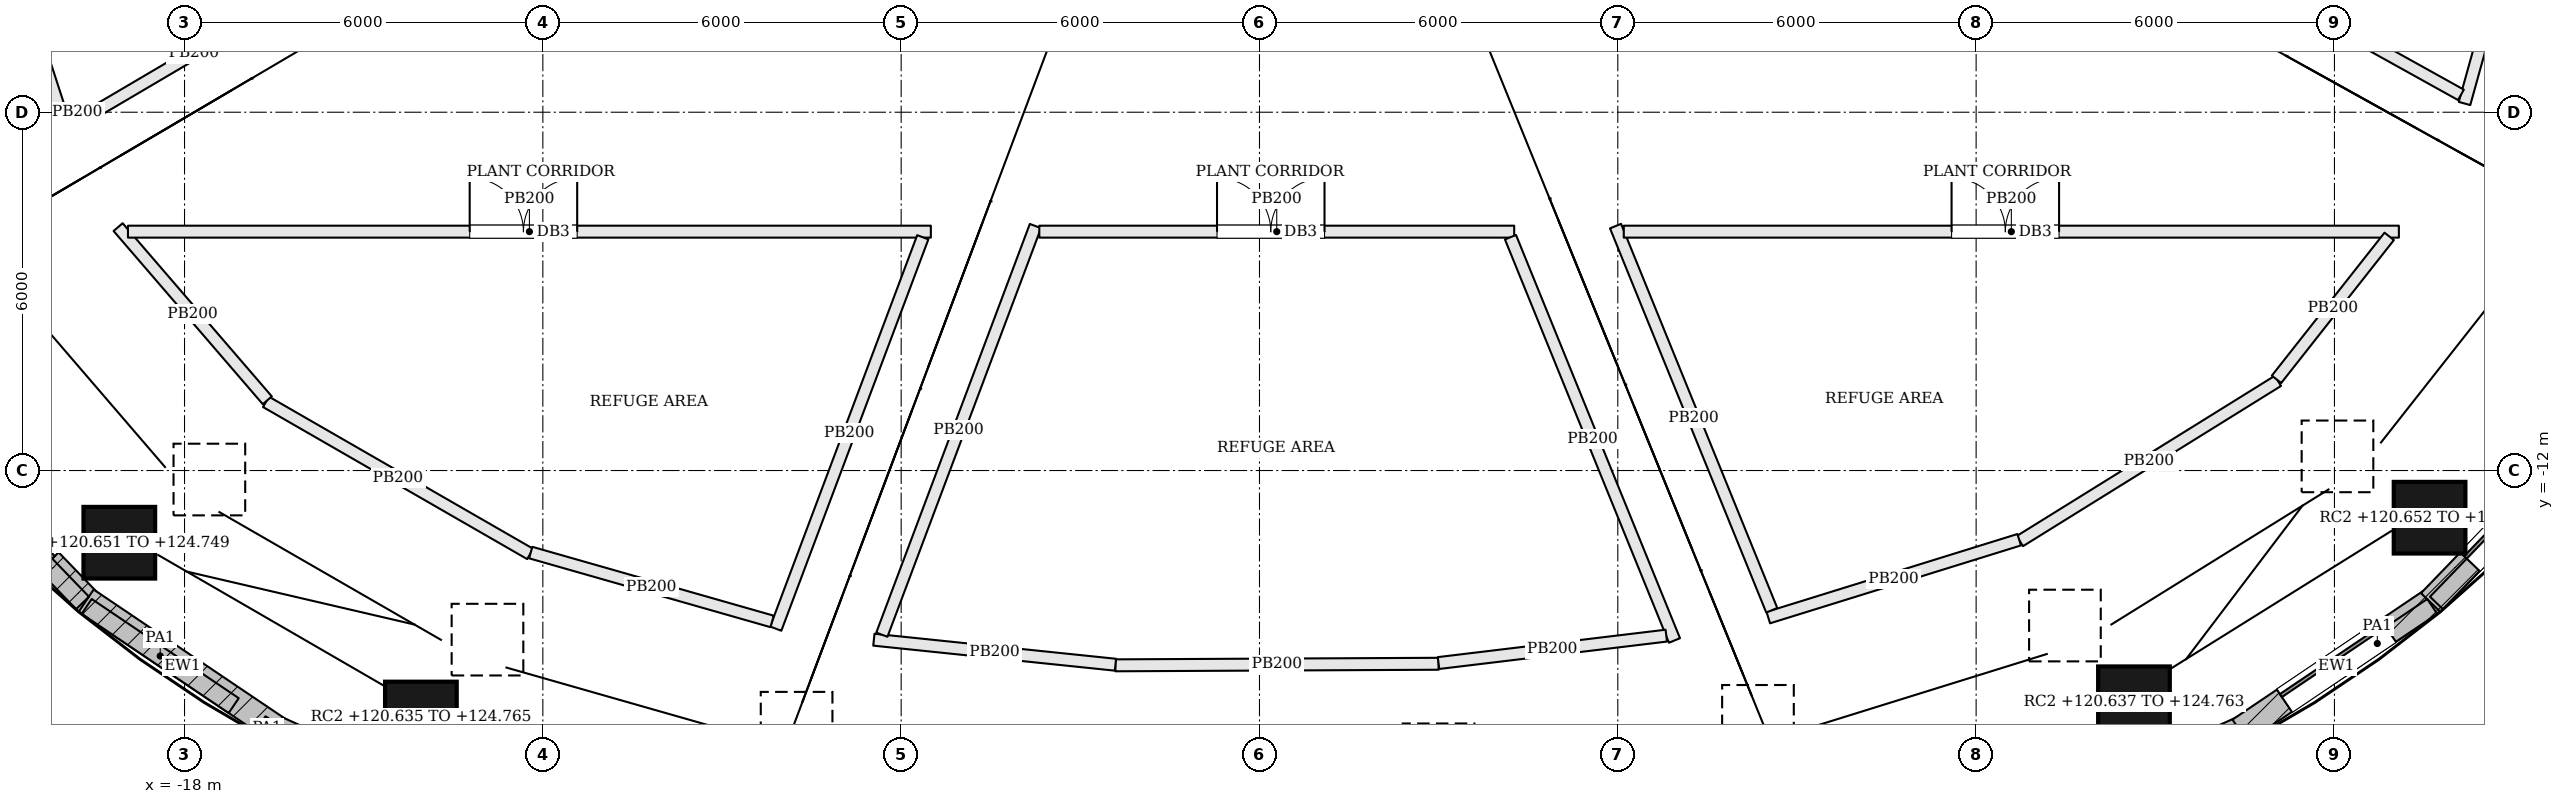
"""IFC4 building model, lengths in metres.
Left out: names, types, materials, properties, quantities, classifications, styles, units other than length and angle.
Written with IfcOpenShell. Run it as: python <this file> out.ifc"""

import sys

from ifc_helpers import new_model, si_unit, direction, frame, frame_2d, origin, origin_2d, place, context, subcontext, project, spatial, rectangle, extrude, element, fill, save


model = new_model("IFC4")
c1 = context("Model", 3, precision=1e-05, world=origin(), true_north=direction((0.0, 1.0)))
c2 = subcontext(c1, "Body", "Model", "MODEL_VIEW")
j1 = project(units=[si_unit("LENGTHUNIT", "METRE"), si_unit("PLANEANGLEUNIT", "RADIAN")], contexts=[c1])
p1 = place(None, origin())
s1 = spatial("IfcSite", under=j1, at=p1, CompositionType="ELEMENT")
p2 = place(p1, origin())
s2 = spatial("IfcBuilding", under=s1, at=p2, CompositionType="ELEMENT")
p3 = place(p2, frame((0.0, 0.0, 121.2)))
s3 = spatial("IfcBuildingStorey", under=s2, at=p3, CompositionType="ELEMENT", Elevation=121.2)
p4 = place(p3, frame((-19.092, -13.209, -0.549), z_axis=(0.335632832072, 0.235491775004, 0.912082356995), x_axis=(-0.574360318683, 0.818602604639, 0.0)))
e1 = element("IfcColumn", 1, at=p4, inside=s3, PredefinedType="COLUMN", context=c2, shape_type="SweptSolid", body=[
    extrude(rectangle(XDim=1.2, YDim=1.2, at=origin_2d()), origin(), (0.0, 0.0, 1.0), 4.493),
])
p5 = place(p3, frame((-14.042, -16.136, -0.565), z_axis=(0.249322923068, 0.291577344451, 0.923482935541), x_axis=(-0.760029513811, 0.649888558243, 0.0)))
e2 = element("IfcColumn", 2, at=p5, inside=s3, PredefinedType="COLUMN", context=c2, shape_type="SweptSolid", body=[
    extrude(rectangle(XDim=1.2, YDim=1.2, at=origin_2d()), origin(), (0.0, 0.0, 1.0), 4.472),
])
p6 = place(p3, frame((-8.422, -17.749, -0.581), z_axis=(0.15062528585, 0.323660808846, 0.934106901848), x_axis=(-0.906629641713, 0.421927354845, 0.0)))
e3 = element("IfcColumn", 3, at=p6, inside=s3, PredefinedType="COLUMN", context=c2, shape_type="SweptSolid", body=[
    extrude(rectangle(XDim=1.2, YDim=1.2, at=origin_2d()), origin(), (0.0, 0.0, 1.0), 4.456),
])
p7 = place(p3, frame((-2.602, -18.358, -0.591), z_axis=(0.047218787355, 0.33640640712, 0.940532357428), x_axis=(-0.990292415941, 0.138999751544, 0.0)))
e4 = element("IfcColumn", 4, at=p7, inside=s3, PredefinedType="COLUMN", context=c2, shape_type="SweptSolid", body=[
    extrude(rectangle(XDim=1.2, YDim=1.2, at=origin_2d()), origin(), (0.0, 0.0, 1.0), 4.447),
])
p8 = place(p3, frame((3.254, -18.33, -0.591), z_axis=(-0.05729856294, 0.335888127577, 0.940157455131), x_axis=(-0.985759878424, -0.168159038084, 0.0)))
e5 = element("IfcColumn", 5, at=p8, inside=s3, PredefinedType="COLUMN", context=c2, shape_type="SweptSolid", body=[
    extrude(rectangle(XDim=1.2, YDim=1.2, at=origin_2d()), origin(), (0.0, 0.0, 1.0), 4.448),
])
p9 = place(p3, frame((9.063, -17.625, -0.579), z_axis=(-0.160699820662, 0.321618802348, 0.933132848857), x_axis=(-0.89454907246, -0.446969749493, 0.0)))
e6 = element("IfcColumn", 6, at=p9, inside=s3, PredefinedType="COLUMN", context=c2, shape_type="SweptSolid", body=[
    extrude(rectangle(XDim=1.2, YDim=1.2, at=origin_2d()), origin(), (0.0, 0.0, 1.0), 4.456),
])
p10 = place(p3, frame((14.643, -15.881, -0.563), z_axis=(-0.258415459479, 0.28728595115, 0.922327616725), x_axis=(-0.743476713513, -0.66876182342, 0.0)))
e7 = element("IfcColumn", 7, at=p10, inside=s3, PredefinedType="COLUMN", context=c2, shape_type="SweptSolid", body=[
    extrude(rectangle(XDim=1.2, YDim=1.2, at=origin_2d()), origin(), (0.0, 0.0, 1.0), 4.473),
])
p11 = place(p3, frame((19.593, -12.79, -0.548), z_axis=(-0.343008470869, 0.228473185077, 0.911123039229), x_axis=(-0.554365652735, -0.832273226211, 0.0)))
e8 = element("IfcColumn", 8, at=p11, inside=s3, PredefinedType="COLUMN", context=c2, shape_type="SweptSolid", body=[
    extrude(rectangle(XDim=1.2, YDim=1.2, at=origin_2d()), origin(), (0.0, 0.0, 1.0), 4.496),
])
p12 = place(p3, frame((-22.386, -11.333, 0.0), z_axis=(0.0, 0.0, 1.0), x_axis=(0.694225992979, -0.719757091436, 0.0)))
e9 = element("IfcWall", 9, at=p12, inside=s3, PredefinedType="SOLIDWALL", context=c2, shape_type="SweptSolid", body=[
    extrude(rectangle(XDim=3.997, YDim=0.45, at=frame_2d((1.999, 0.0))), origin(), (0.0, 0.0, 1.0), 4.3),
])
p13 = place(p12, frame((0.948, 0.0, 1.2)))
e10 = element("IfcOpeningElement", 10, at=p13, cuts=e9, PredefinedType="OPENING", context=c2, shape_type="SweptSolid", body=[
    extrude(rectangle(XDim=2.1, YDim=1.8, at=frame_2d((1.05, 0.9))), frame((0.0, 0.235, 0.0), z_axis=(0.0, -1.0, 0.0), x_axis=(1.0, 0.0, 0.0)), (0.0, 0.0, 1.0), 0.47),
])
p14 = place(p3, frame((-19.647, -14.179, 0.0), z_axis=(0.0, 0.0, 1.0), x_axis=(0.829039015156, -0.559190764721, 0.0)))
e11 = element("IfcWall", 11, at=p14, inside=s3, PredefinedType="SOLIDWALL", context=c2, shape_type="SweptSolid", body=[
    extrude(rectangle(XDim=3.895, YDim=0.45, at=frame_2d((1.947, 0.0))), origin(), (0.0, 0.0, 1.0), 4.3),
])
p15 = place(p3, frame((-16.452, -16.339, 0.0), z_axis=(0.0, 0.0, 1.0), x_axis=(0.912495881005, -0.409085892142, 0.0)))
e12 = element("IfcWall", 12, at=p15, inside=s3, PredefinedType="SOLIDWALL", context=c2, shape_type="SweptSolid", body=[
    extrude(rectangle(XDim=3.74, YDim=0.45, at=frame_2d((1.87, 0.0))), origin(), (0.0, 0.0, 1.0), 4.3),
])
p16 = place(p15, frame((0.82, 0.0, 1.2)))
e13 = element("IfcOpeningElement", 13, at=p16, cuts=e12, PredefinedType="OPENING", context=c2, shape_type="SweptSolid", body=[
    extrude(rectangle(XDim=2.1, YDim=1.8, at=frame_2d((1.05, 0.9))), frame((0.0, 0.235, 0.0), z_axis=(0.0, -1.0, 0.0), x_axis=(1.0, 0.0, 0.0)), (0.0, 0.0, 1.0), 0.47),
])
p17 = place(p3, frame((13.039, -17.869, 0.0), z_axis=(0.0, 0.0, 1.0), x_axis=(0.912495881005, 0.409085892142, 0.0)))
e14 = element("IfcWall", 14, at=p17, inside=s3, PredefinedType="SOLIDWALL", context=c2, shape_type="SweptSolid", body=[
    extrude(rectangle(XDim=3.74, YDim=0.45, at=frame_2d((1.87, 0.0))), origin(), (0.0, 0.0, 1.0), 4.3),
])
p18 = place(p17, frame((0.82, 0.0, 1.2)))
e15 = element("IfcOpeningElement", 15, at=p18, cuts=e14, PredefinedType="OPENING", context=c2, shape_type="SweptSolid", body=[
    extrude(rectangle(XDim=2.1, YDim=1.8, at=frame_2d((1.05, 0.9))), frame((0.0, 0.235, 0.0), z_axis=(0.0, -1.0, 0.0), x_axis=(1.0, 0.0, 0.0)), (0.0, 0.0, 1.0), 0.47),
])
p19 = place(p3, frame((16.418, -16.357, 0.0), z_axis=(0.0, 0.0, 1.0), x_axis=(0.829039015156, 0.559190764721, 0.0)))
e16 = element("IfcWall", 16, at=p19, inside=s3, PredefinedType="SOLIDWALL", context=c2, shape_type="SweptSolid", body=[
    extrude(rectangle(XDim=3.895, YDim=0.45, at=frame_2d((1.947, 0.0))), origin(), (0.0, 0.0, 1.0), 4.3),
])
p20 = place(p19, frame((0.897, 0.0, 1.2)))
e17 = element("IfcOpeningElement", 17, at=p20, cuts=e16, PredefinedType="OPENING", context=c2, shape_type="SweptSolid", body=[
    extrude(rectangle(XDim=2.1, YDim=1.8, at=frame_2d((1.05, 0.9))), frame((0.0, 0.235, 0.0), z_axis=(0.0, -1.0, 0.0), x_axis=(1.0, 0.0, 0.0)), (0.0, 0.0, 1.0), 0.47),
])
p21 = place(p3, frame((19.611, -14.21, 0.0), z_axis=(0.0, 0.0, 1.0), x_axis=(0.694225992979, 0.719757091436, 0.0)))
e18 = element("IfcWall", 18, at=p21, inside=s3, PredefinedType="SOLIDWALL", context=c2, shape_type="SweptSolid", body=[
    extrude(rectangle(XDim=3.997, YDim=0.45, at=frame_2d((1.999, 0.0))), origin(), (0.0, 0.0, 1.0), 4.3),
])
p22 = place(p21, frame((0.948, 0.0, 1.2)))
e19 = element("IfcOpeningElement", 19, at=p22, cuts=e18, PredefinedType="OPENING", context=c2, shape_type="SweptSolid", body=[
    extrude(rectangle(XDim=2.1, YDim=1.8, at=frame_2d((1.05, 0.9))), frame((0.0, 0.235, 0.0), z_axis=(0.0, -1.0, 0.0), x_axis=(1.0, 0.0, 0.0)), (0.0, 0.0, 1.0), 0.47),
])
p23 = place(p3, frame((-21.591, -12.265, 4.5), z_axis=(0.0, 0.0, 1.0), x_axis=(0.694208865457, -0.719773611021, 0.0)))
e20 = element("IfcWall", 20, at=p23, inside=s3, PredefinedType="PARAPET", context=c2, shape_type="SweptSolid", body=[
    extrude(rectangle(XDim=2.712, YDim=0.3, at=frame_2d((1.356, 0.0))), origin(), (0.0, 0.0, 1.0), 1.1),
])
p24 = place(p3, frame((-19.638, -14.276, 4.5), z_axis=(0.0, 0.0, 1.0), x_axis=(0.829040216943, -0.559188982984, 0.0)))
e21 = element("IfcWall", 21, at=p24, inside=s3, PredefinedType="PARAPET", context=c2, shape_type="SweptSolid", body=[
    extrude(rectangle(XDim=2.969, YDim=0.3, at=frame_2d((1.485, 0.0))), origin(), (0.0, 0.0, 1.0), 1.1),
])
p25 = place(p3, frame((-16.727, -16.24, 4.5), z_axis=(0.0, 0.0, 1.0), x_axis=(0.828784756912, -0.559567535432, 0.0)))
e22 = element("IfcWall", 22, at=p25, inside=s3, PredefinedType="PARAPET", context=c2, shape_type="SweptSolid", body=[
    extrude(rectangle(XDim=0.266, YDim=0.3, at=frame_2d((0.133, 0.0))), origin(), (0.0, 0.0, 1.0), 1.1),
])
p26 = place(p3, frame((17.798, -15.518, 4.5), z_axis=(0.0, 0.0, 1.0), x_axis=(0.829009285229, 0.559234838868, 0.0)))
e23 = element("IfcWall", 23, at=p26, inside=s3, PredefinedType="PARAPET", context=c2, shape_type="SweptSolid", body=[
    extrude(rectangle(XDim=2.22, YDim=0.3, at=frame_2d((1.11, 0.0))), origin(), (0.0, 0.0, 1.0), 1.1),
])
p27 = place(p3, frame((19.708, -14.218, 4.5), z_axis=(0.0, 0.0, 1.0), x_axis=(0.694246491391, 0.719737319576, 0.0)))
e24 = element("IfcWall", 24, at=p27, inside=s3, PredefinedType="PARAPET", context=c2, shape_type="SweptSolid", body=[
    extrude(rectangle(XDim=3.869, YDim=0.3, at=frame_2d((1.935, 0.0))), origin(), (0.0, 0.0, 1.0), 1.1),
])
p28 = place(p3, frame((-12.212, -13.397, 0.0), z_axis=(0.0, 0.0, 1.0), x_axis=(-0.866649402915, 0.498917640926, 0.0)))
e25 = element("IfcWall", 25, at=p28, inside=s3, PredefinedType="PARTITIONING", context=c2, shape_type="SweptSolid", body=[
    extrude(rectangle(XDim=5.105, YDim=0.2, at=frame_2d((2.552, 0.0))), origin(), (0.0, 0.0, 1.0), 4.3),
])
p29 = place(p3, frame((-16.614, -10.824, 0.0), z_axis=(0.0, 0.0, 1.0), x_axis=(-0.652659458067, 0.757651391998, 0.0)))
e26 = element("IfcWall", 26, at=p29, inside=s3, PredefinedType="PARTITIONING", context=c2, shape_type="SweptSolid", body=[
    extrude(rectangle(XDim=3.827, YDim=0.2, at=frame_2d((1.914, 0.0))), origin(), (0.0, 0.0, 1.0), 4.3),
])
p30 = place(p3, frame((-18.947, -8.0, 0.0), z_axis=(0.0, 0.0, 1.0), x_axis=(1.0, 0.0, 0.0)))
e27 = element("IfcWall", 27, at=p30, inside=s3, PredefinedType="PARTITIONING", context=c2, shape_type="SweptSolid", body=[
    extrude(rectangle(XDim=13.444, YDim=0.2, at=frame_2d((6.722, 0.0))), origin(), (0.0, 0.0, 1.0), 4.3),
])
p31 = place(p30, frame((5.722, 0.0, 0.0)))
e28 = element("IfcOpeningElement", 28, at=p31, cuts=e27, PredefinedType="OPENING", context=c2, shape_type="SweptSolid", body=[
    extrude(rectangle(XDim=1.8, YDim=2.1, at=frame_2d((0.9, 1.05))), frame((0.0, 0.11, 0.0), z_axis=(0.0, -1.0, 0.0), x_axis=(1.0, 0.0, 0.0)), (0.0, 0.0, 1.0), 0.22),
])
p32 = place(p3, frame((-5.638, -8.094, 0.0), z_axis=(0.0, 0.0, 1.0), x_axis=(-0.351677500082, -0.936121218612, 0.0)))
e29 = element("IfcWall", 29, at=p32, inside=s3, PredefinedType="PARTITIONING", context=c2, shape_type="SweptSolid", body=[
    extrude(rectangle(XDim=7.001, YDim=0.2, at=frame_2d((3.5, 0.0))), origin(), (0.0, 0.0, 1.0), 4.3),
])
p33 = place(p3, frame((-8.161, -14.527, 0.0), z_axis=(0.0, 0.0, 1.0), x_axis=(-0.961635651989, 0.27432986134, 0.0)))
e30 = element("IfcWall", 30, at=p33, inside=s3, PredefinedType="PARTITIONING", context=c2, shape_type="SweptSolid", body=[
    extrude(rectangle(XDim=4.203, YDim=0.2, at=frame_2d((2.102, 0.0))), origin(), (0.0, 0.0, 1.0), 4.3),
])
p34 = place(p3, frame((2.999, -15.236, 0.0), z_axis=(0.0, 0.0, 1.0), x_axis=(-0.999988568025, -0.004781612604, 0.0)))
e31 = element("IfcWall", 31, at=p34, inside=s3, PredefinedType="PARTITIONING", context=c2, shape_type="SweptSolid", body=[
    extrude(rectangle(XDim=5.412, YDim=0.2, at=frame_2d((2.706, 0.0))), origin(), (0.0, 0.0, 1.0), 4.3),
])
p35 = place(p3, frame((-2.412, -15.252, 0.0), z_axis=(0.0, 0.0, 1.0), x_axis=(-0.994679072695, 0.103022047848, 0.0)))
e32 = element("IfcWall", 32, at=p35, inside=s3, PredefinedType="PARTITIONING", context=c2, shape_type="SweptSolid", body=[
    extrude(rectangle(XDim=4.067, YDim=0.2, at=frame_2d((2.033, 0.0))), origin(), (0.0, 0.0, 1.0), 4.3),
])
p36 = place(p3, frame((-6.323, -14.749, 0.0), z_axis=(0.0, 0.0, 1.0), x_axis=(0.351712638028, 0.936108017406, 0.0)))
e33 = element("IfcWall", 33, at=p36, inside=s3, PredefinedType="PARTITIONING", context=c2, shape_type="SweptSolid", body=[
    extrude(rectangle(XDim=7.31, YDim=0.2, at=frame_2d((3.655, 0.0))), origin(), (0.0, 0.0, 1.0), 4.3),
])
p37 = place(p3, frame((-3.687, -8.0, 0.0), z_axis=(0.0, 0.0, 1.0), x_axis=(1.0, 0.0, 0.0)))
e34 = element("IfcWall", 34, at=p37, inside=s3, PredefinedType="PARTITIONING", context=c2, shape_type="SweptSolid", body=[
    extrude(rectangle(XDim=7.952, YDim=0.2, at=frame_2d((3.976, 0.0))), origin(), (0.0, 0.0, 1.0), 4.3),
])
p38 = place(p37, frame((2.976, 0.0, 0.0)))
e35 = element("IfcOpeningElement", 35, at=p38, cuts=e34, PredefinedType="OPENING", context=c2, shape_type="SweptSolid", body=[
    extrude(rectangle(XDim=1.8, YDim=2.1, at=frame_2d((0.9, 1.05))), frame((0.0, 0.11, 0.0), z_axis=(0.0, -1.0, 0.0), x_axis=(1.0, 0.0, 0.0)), (0.0, 0.0, 1.0), 0.22),
])
p39 = place(p3, frame((4.203, -8.093, 0.0), z_axis=(0.0, 0.0, 1.0), x_axis=(0.376696822857, -0.926336603859, 0.0)))
e36 = element("IfcWall", 36, at=p39, inside=s3, PredefinedType="PARTITIONING", context=c2, shape_type="SweptSolid", body=[
    extrude(rectangle(XDim=7.29, YDim=0.2, at=frame_2d((3.645, 0.0))), origin(), (0.0, 0.0, 1.0), 4.3),
])
p40 = place(p3, frame((6.812, -14.765, 0.0), z_axis=(0.0, 0.0, 1.0), x_axis=(-0.992828943228, -0.119543671887, 0.0)))
e37 = element("IfcWall", 37, at=p40, inside=s3, PredefinedType="PARTITIONING", context=c2, shape_type="SweptSolid", body=[
    extrude(rectangle(XDim=3.842, YDim=0.2, at=frame_2d((1.921, 0.0))), origin(), (0.0, 0.0, 1.0), 4.3),
])
p41 = place(p3, frame((17.053, -10.499, 0.0), z_axis=(0.0, 0.0, 1.0), x_axis=(-0.849566735231, -0.527481148847, 0.0)))
e38 = element("IfcWall", 38, at=p41, inside=s3, PredefinedType="PARTITIONING", context=c2, shape_type="SweptSolid", body=[
    extrude(rectangle(XDim=5.086, YDim=0.2, at=frame_2d((2.543, 0.0))), origin(), (0.0, 0.0, 1.0), 4.3),
])
p42 = place(p3, frame((12.721, -13.159, 0.0), z_axis=(0.0, 0.0, 1.0), x_axis=(-0.955050049142, -0.296444604665, 0.0)))
e39 = element("IfcWall", 39, at=p42, inside=s3, PredefinedType="PARTITIONING", context=c2, shape_type="SweptSolid", body=[
    extrude(rectangle(XDim=4.399, YDim=0.2, at=frame_2d((2.199, 0.0))), origin(), (0.0, 0.0, 1.0), 4.3),
])
p43 = place(p3, frame((8.578, -14.34, 0.0), z_axis=(0.0, 0.0, 1.0), x_axis=(-0.376688206905, 0.926340107508, 0.0)))
e40 = element("IfcWall", 40, at=p43, inside=s3, PredefinedType="PARTITIONING", context=c2, shape_type="SweptSolid", body=[
    extrude(rectangle(XDim=6.945, YDim=0.2, at=frame_2d((3.472, 0.0))), origin(), (0.0, 0.0, 1.0), 4.3),
])
p44 = place(p3, frame((6.1, -8.0, 0.0), z_axis=(0.0, 0.0, 1.0), x_axis=(1.0, 0.0, 0.0)))
e41 = element("IfcWall", 41, at=p44, inside=s3, PredefinedType="PARTITIONING", context=c2, shape_type="SweptSolid", body=[
    extrude(rectangle(XDim=12.979, YDim=0.2, at=frame_2d((6.49, 0.0))), origin(), (0.0, 0.0, 1.0), 4.3),
])
p45 = place(p44, frame((5.489, 0.0, 0.0)))
e42 = element("IfcOpeningElement", 42, at=p45, cuts=e41, PredefinedType="OPENING", context=c2, shape_type="SweptSolid", body=[
    extrude(rectangle(XDim=1.8, YDim=2.1, at=frame_2d((0.9, 1.05))), frame((0.0, 0.11, 0.0), z_axis=(0.0, -1.0, 0.0), x_axis=(1.0, 0.0, 0.0)), (0.0, 0.0, 1.0), 0.22),
])
p46 = place(p3, frame((18.917, -8.079, 0.0), z_axis=(0.0, 0.0, 1.0), x_axis=(-0.619062396882, -0.785341803782, 0.0)))
e43 = element("IfcWall", 43, at=p46, inside=s3, PredefinedType="PARTITIONING", context=c2, shape_type="SweptSolid", body=[
    extrude(rectangle(XDim=3.048, YDim=0.2, at=frame_2d((1.524, 0.0))), origin(), (0.0, 0.0, 1.0), 4.3),
])
p47 = place(p3, frame((-20.046, -6.095, 0.0), z_axis=(0.0, 0.0, 1.0), x_axis=(-0.308485001062, 0.951229206931, 0.0)))
e44 = element("IfcWall", 44, at=p47, inside=s3, PredefinedType="PARTITIONING", context=c2, shape_type="SweptSolid", body=[
    extrude(rectangle(XDim=3.637, YDim=0.2, at=frame_2d((1.819, 0.0))), origin(), (0.0, 0.0, 1.0), 4.3),
])
p48 = place(p3, frame((-16.086, -3.983, 0.0), z_axis=(0.0, 0.0, 1.0), x_axis=(-0.861769442787, -0.5073001355, 0.0)))
e45 = element("IfcWall", 45, at=p48, inside=s3, PredefinedType="PARTITIONING", context=c2, shape_type="SweptSolid", body=[
    extrude(rectangle(XDim=4.077, YDim=0.2, at=frame_2d((2.038, 0.0))), origin(), (0.0, 0.0, 1.0), 4.3),
])
p49 = place(p3, frame((-19.613, -6.0, 0.0), z_axis=(0.0, 0.0, 1.0), x_axis=(-1.0, 0.0, 0.0)))
e46 = element("IfcWall", 46, at=p49, inside=s3, PredefinedType="PARTITIONING", context=c2, shape_type="SweptSolid", body=[
    extrude(rectangle(XDim=0.364, YDim=0.2, at=frame_2d((0.182, 0.0))), origin(), (0.0, 0.0, 1.0), 4.3),
])
p50 = place(p3, frame((21.172, -2.277, 0.0), z_axis=(0.0, 0.0, 1.0), x_axis=(-0.267782922221, -0.963479271478, 0.0)))
e47 = element("IfcWall", 47, at=p50, inside=s3, PredefinedType="PARTITIONING", context=c2, shape_type="SweptSolid", body=[
    extrude(rectangle(XDim=3.712, YDim=0.2, at=frame_2d((1.856, 0.0))), origin(), (0.0, 0.0, 1.0), 4.3),
])
p51 = place(p3, frame((20.118, -5.709, 0.0), z_axis=(0.0, 0.0, 1.0), x_axis=(-0.874078265919, 0.4857851223, 0.0)))
e48 = element("IfcWall", 48, at=p51, inside=s3, PredefinedType="PARTITIONING", context=c2, shape_type="SweptSolid", body=[
    extrude(rectangle(XDim=4.811, YDim=0.2, at=frame_2d((2.405, 0.0))), origin(), (0.0, 0.0, 1.0), 4.3),
])
p52 = place(p13, origin())
e49 = element("IfcWindow", 49, at=p52, inside=s3, PartitioningType="SINGLE_PANEL", PredefinedType="WINDOW", context=c2, shape_type="SweptSolid", body=[
    extrude(rectangle(XDim=2.1, YDim=1.8, at=frame_2d((1.05, 0.9))), frame((0.0, 0.135, 0.0), z_axis=(0.0, -1.0, 0.0), x_axis=(1.0, 0.0, 0.0)), (0.0, 0.0, 1.0), 0.06),
])
fill(e10, e49)
p53 = place(p20, origin())
e50 = element("IfcWindow", 50, at=p53, inside=s3, PartitioningType="SINGLE_PANEL", PredefinedType="WINDOW", context=c2, shape_type="SweptSolid", body=[
    extrude(rectangle(XDim=2.1, YDim=1.8, at=frame_2d((1.05, 0.9))), frame((0.0, 0.135, 0.0), z_axis=(0.0, -1.0, 0.0), x_axis=(1.0, 0.0, 0.0)), (0.0, 0.0, 1.0), 0.06),
])
fill(e17, e50)
p54 = place(p22, origin())
e51 = element("IfcWindow", 51, at=p54, inside=s3, PartitioningType="SINGLE_PANEL", PredefinedType="WINDOW", context=c2, shape_type="SweptSolid", body=[
    extrude(rectangle(XDim=2.1, YDim=1.8, at=frame_2d((1.05, 0.9))), frame((0.0, 0.135, 0.0), z_axis=(0.0, -1.0, 0.0), x_axis=(1.0, 0.0, 0.0)), (0.0, 0.0, 1.0), 0.06),
])
fill(e19, e51)
p55 = place(p31, origin())
e52 = element("IfcDoor", 52, at=p55, inside=s3, OperationType="DOUBLE_DOOR_SINGLE_SWING", PredefinedType="DOOR", context=c2, shape_type="SweptSolid", body=[
    extrude(rectangle(XDim=1.8, YDim=2.1, at=frame_2d((0.9, 1.05))), frame((0.0, 0.025, 0.0), z_axis=(0.0, -1.0, 0.0), x_axis=(1.0, 0.0, 0.0)), (0.0, 0.0, 1.0), 0.05),
])
fill(e28, e52)
p56 = place(p38, origin())
e53 = element("IfcDoor", 53, at=p56, inside=s3, OperationType="DOUBLE_DOOR_SINGLE_SWING", PredefinedType="DOOR", context=c2, shape_type="SweptSolid", body=[
    extrude(rectangle(XDim=1.8, YDim=2.1, at=frame_2d((0.9, 1.05))), frame((0.0, 0.025, 0.0), z_axis=(0.0, -1.0, 0.0), x_axis=(1.0, 0.0, 0.0)), (0.0, 0.0, 1.0), 0.05),
])
fill(e35, e53)
p57 = place(p45, origin())
e54 = element("IfcDoor", 54, at=p57, inside=s3, OperationType="DOUBLE_DOOR_SINGLE_SWING", PredefinedType="DOOR", context=c2, shape_type="SweptSolid", body=[
    extrude(rectangle(XDim=1.8, YDim=2.1, at=frame_2d((0.9, 1.05))), frame((0.0, 0.025, 0.0), z_axis=(0.0, -1.0, 0.0), x_axis=(1.0, 0.0, 0.0)), (0.0, 0.0, 1.0), 0.05),
])
fill(e42, e54)
save(model, sys.argv[1])
